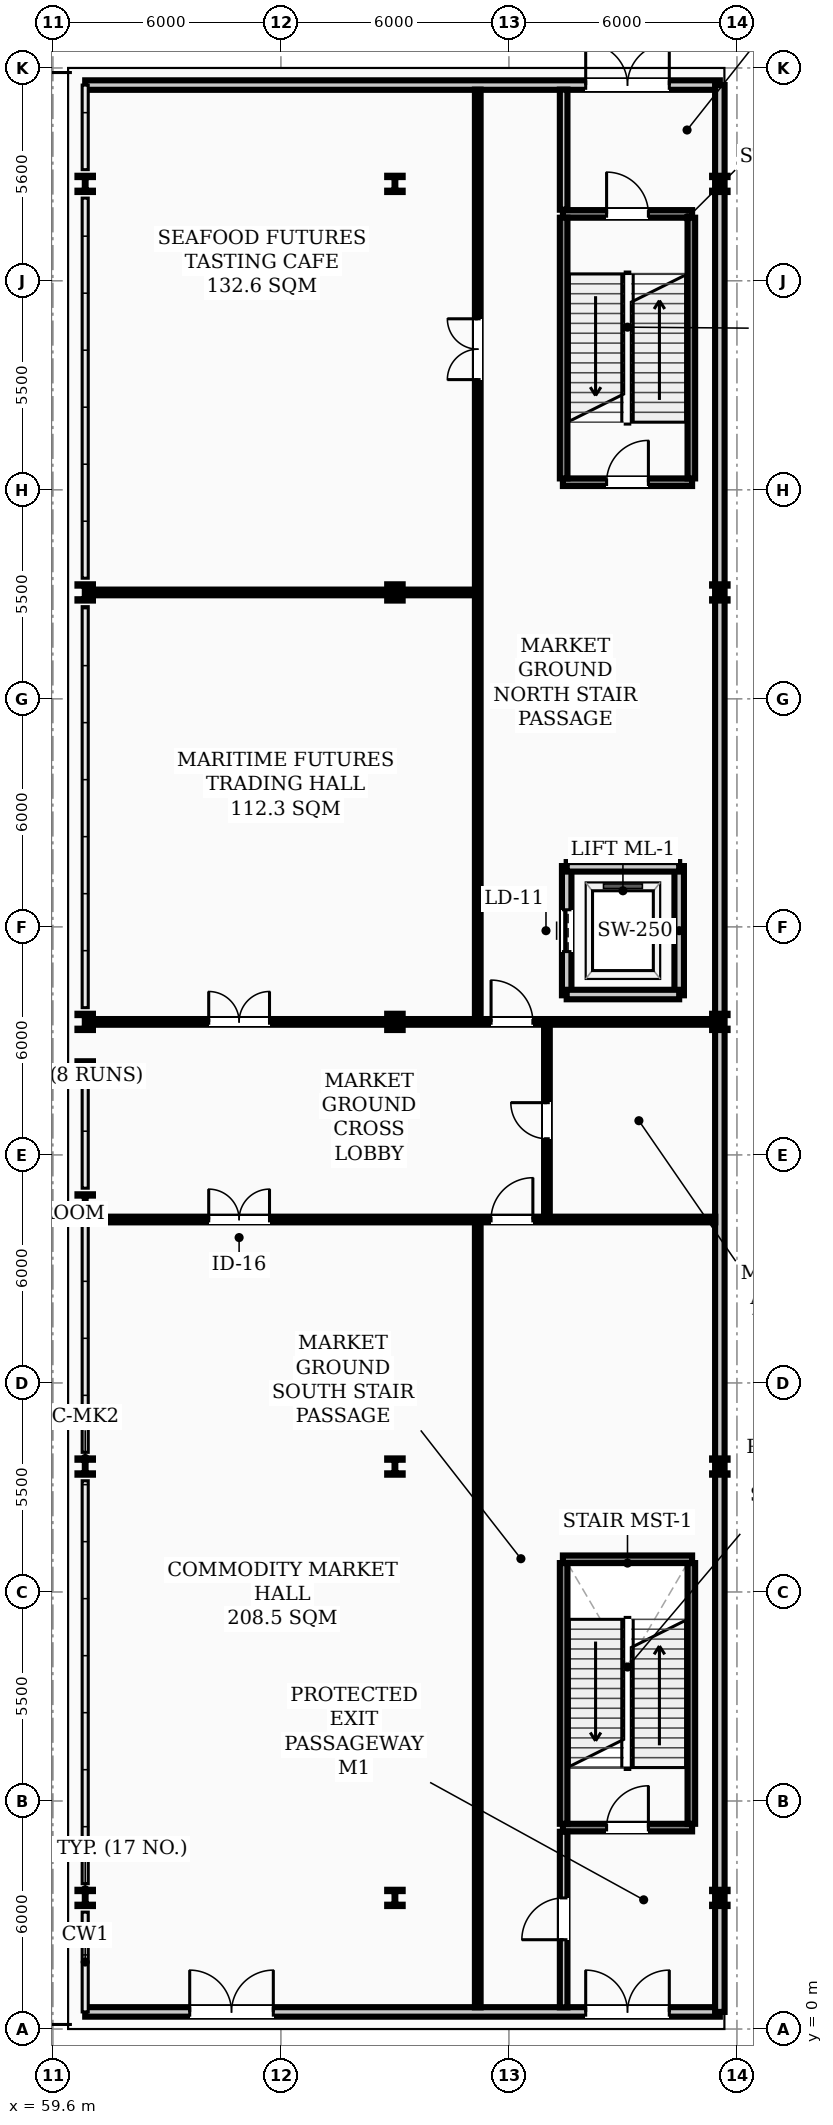
"""IFC4 building model, lengths in metres.
Left out: names, types, materials, properties, quantities, classifications, styles, units other than length and angle.
Written with IfcOpenShell. Run it as: python <this file> out.ifc"""

import sys

from ifc_helpers import new_model, si_unit, direction, frame, frame_2d, origin, origin_2d, place, context, subcontext, project, spatial, rectangle, i_section, extrude, element, fill, save


model = new_model("IFC4")
c1 = context("Model", 3, precision=1e-05, world=origin(), true_north=direction((0.0, 1.0)))
c2 = subcontext(c1, "Body", "Model", "MODEL_VIEW")
j1 = project(units=[si_unit("LENGTHUNIT", "METRE"), si_unit("PLANEANGLEUNIT", "RADIAN")], contexts=[c1])
p1 = place(None, origin())
s1 = spatial("IfcSite", under=j1, at=p1, CompositionType="ELEMENT")
p2 = place(p1, origin())
s2 = spatial("IfcBuilding", under=s1, at=p2, CompositionType="ELEMENT")
p3 = place(p2, origin())
s3 = spatial("IfcBuildingStorey", under=s2, at=p3, CompositionType="ELEMENT", Elevation=0.0)
for number, where, z_axis, x_axis in (
    (1, (60.45, 3.45, 0.0), (0.0, 0.0, 1.0), (1.0, 0.0, 0.0)),
    (2, (60.45, 14.8, 0.0), (0.0, 0.0, 1.0), (1.0, 0.0, 0.0)),
    (3, (60.45, 21.75, 0.0), (0.0, 0.0, 1.0), (1.0, 0.0, 0.0)),
    (4, (60.45, 25.25, 0.0), (0.0, 0.0, 1.0), (1.0, 0.0, 0.0)),
    (5, (60.45, 26.5, 0.0), (0.0, 0.0, 1.0), (1.0, 0.0, 0.0)),
    (6, (60.45, 37.8, 0.0), (0.0, 0.0, 1.0), (1.0, 0.0, 0.0)),
    (7, (60.45, 48.55, 0.0), (0.0, 0.0, 1.0), (1.0, 0.0, 0.0)),
    (8, (68.6, 3.45, 0.0), (0.0, 0.0, 1.0), (1.0, 0.0, 0.0)),
    (9, (68.6, 14.8, 0.0), (0.0, 0.0, 1.0), (1.0, 0.0, 0.0)),
    (10, (68.6, 26.5, 0.0), (0.0, 0.0, 1.0), (1.0, 0.0, 0.0)),
    (11, (68.6, 37.8, 0.0), (0.0, 0.0, 1.0), (1.0, 0.0, 0.0)),
    (12, (68.6, 48.55, 0.0), (0.0, 0.0, 1.0), (1.0, 0.0, 0.0)),
    (13, (77.15, 3.45, 0.0), (0.0, 0.0, 1.0), (1.0, 0.0, 0.0)),
    (14, (77.15, 14.8, 0.0), (0.0, 0.0, 1.0), (1.0, 0.0, 0.0)),
    (15, (77.15, 26.5, 0.0), (0.0, 0.0, 1.0), (1.0, 0.0, 0.0)),
    (16, (77.15, 37.8, 0.0), (0.0, 0.0, 1.0), (1.0, 0.0, 0.0)),
    (17, (77.15, 48.55, 0.0), (0.0, 0.0, 1.0), (1.0, 0.0, 0.0)),
):
    element("IfcColumn", number, at=place(p3, frame(where, z_axis=z_axis, x_axis=x_axis)), inside=s3, PredefinedType="COLUMN", context=c2, shape_type="SweptSolid", body=[
        extrude(i_section(OverallWidth=0.407, OverallDepth=0.428, WebThickness=0.02, FlangeThickness=0.035, FilletRadius=0.022, at=origin_2d()), origin(), (0.0, 0.0, 1.0), 5.8),
    ])
p4 = place(p3, frame((60.45, 0.45, 0.0), z_axis=(0.0, 0.0, 1.0), x_axis=(1.0, 0.0, 0.0)))
e18 = element("IfcWall", 18, at=p4, inside=s3, PredefinedType="STANDARD", context=c2, shape_type="SweptSolid", body=[
    extrude(rectangle(XDim=16.7, YDim=0.25, at=frame_2d((8.35, 0.0))), origin(), (0.0, 0.0, 1.0), 4.75),
])
p5 = place(p4, frame((2.75, 0.0, 0.0)))
e19 = element("IfcOpeningElement", 19, at=p5, cuts=e18, PredefinedType="OPENING", context=c2, shape_type="SweptSolid", body=[
    extrude(rectangle(XDim=2.2, YDim=2.4, at=frame_2d((1.1, 1.2))), frame((0.0, 0.135, 0.0), z_axis=(0.0, -1.0, 0.0), x_axis=(1.0, 0.0, 0.0)), (0.0, 0.0, 1.0), 0.27),
])
p6 = place(p4, frame((13.17, 0.0, 0.0)))
e20 = element("IfcOpeningElement", 20, at=p6, cuts=e18, PredefinedType="OPENING", context=c2, shape_type="SweptSolid", body=[
    extrude(rectangle(XDim=2.2, YDim=2.4, at=frame_2d((1.1, 1.2))), frame((0.0, 0.135, 0.0), z_axis=(0.0, -1.0, 0.0), x_axis=(1.0, 0.0, 0.0)), (0.0, 0.0, 1.0), 0.27),
])
p7 = place(p3, frame((60.45, 51.15, 0.0), z_axis=(0.0, 0.0, 1.0), x_axis=(1.0, 0.0, 0.0)))
e21 = element("IfcWall", 21, at=p7, inside=s3, PredefinedType="STANDARD", context=c2, shape_type="SweptSolid", body=[
    extrude(rectangle(XDim=16.7, YDim=0.25, at=frame_2d((8.35, 0.0))), origin(), (0.0, 0.0, 1.0), 4.75),
])
p8 = place(p7, frame((13.17, 0.0, 0.0)))
e22 = element("IfcOpeningElement", 22, at=p8, cuts=e21, PredefinedType="OPENING", context=c2, shape_type="SweptSolid", body=[
    extrude(rectangle(XDim=2.2, YDim=2.4, at=frame_2d((1.1, 1.2))), frame((0.0, 0.135, 0.0), z_axis=(0.0, -1.0, 0.0), x_axis=(1.0, 0.0, 0.0)), (0.0, 0.0, 1.0), 0.27),
])
p9 = place(p3, frame((77.15, 0.45, 0.0), z_axis=(0.0, 0.0, 1.0), x_axis=(0.0, 1.0, 0.0)))
e23 = element("IfcWall", 23, at=p9, inside=s3, PredefinedType="STANDARD", context=c2, shape_type="SweptSolid", body=[
    extrude(rectangle(XDim=50.7, YDim=0.25, at=frame_2d((25.35, 0.0))), origin(), (0.0, 0.0, 1.0), 4.75),
])
p10 = place(p3, frame((73.02, 5.3, 0.0), z_axis=(0.0, 0.0, 1.0), x_axis=(1.0, 0.0, 0.0)))
e24 = element("IfcWall", 24, at=p10, inside=s3, PredefinedType="STANDARD", context=c2, shape_type="SweptSolid", body=[
    extrude(rectangle(XDim=3.4, YDim=0.2, at=frame_2d((1.7, 0.0))), origin(), (0.0, 0.0, 1.0), 5.58),
])
p11 = place(p10, frame((1.15, 0.0, 0.0)))
e25 = element("IfcOpeningElement", 25, at=p11, cuts=e24, PredefinedType="OPENING", context=c2, shape_type="SweptSolid", body=[
    extrude(rectangle(XDim=1.1, YDim=2.08, at=frame_2d((0.55, 1.04))), frame((0.0, 0.11, 0.0), z_axis=(0.0, -1.0, 0.0), x_axis=(1.0, 0.0, 0.0)), (0.0, 0.0, 1.0), 0.22),
])
p12 = place(p3, frame((73.02, 12.36, 0.0), z_axis=(0.0, 0.0, 1.0), x_axis=(1.0, 0.0, 0.0)))
e26 = element("IfcWall", 26, at=p12, inside=s3, PredefinedType="STANDARD", context=c2, shape_type="SweptSolid", body=[
    extrude(rectangle(XDim=3.4, YDim=0.2, at=frame_2d((1.7, 0.0))), origin(), (0.0, 0.0, 1.0), 5.58),
])
for number, where, z_axis, x_axis in (
    (27, (73.04, 5.4, 0.0), (0.0, 0.0, 1.0), (0.0, 1.0, 0.0)),
    (28, (76.4, 5.4, 0.0), (0.0, 0.0, 1.0), (0.0, 1.0, 0.0)),
):
    element("IfcWall", number, at=place(p3, frame(where, z_axis=z_axis, x_axis=x_axis)), inside=s3, PredefinedType="STANDARD", context=c2, shape_type="SweptSolid", body=[
        extrude(rectangle(XDim=6.86, YDim=0.2, at=frame_2d((3.43, 0.0))), origin(), (0.0, 0.0, 1.0), 5.58),
    ])
p13 = place(p3, frame((73.02, 40.7, 0.0), z_axis=(0.0, 0.0, 1.0), x_axis=(1.0, 0.0, 0.0)))
e29 = element("IfcWall", 29, at=p13, inside=s3, PredefinedType="STANDARD", context=c2, shape_type="SweptSolid", body=[
    extrude(rectangle(XDim=3.4, YDim=0.2, at=frame_2d((1.7, 0.0))), origin(), (0.0, 0.0, 1.0), 5.58),
])
p14 = place(p13, frame((1.15, 0.0, 0.0)))
e30 = element("IfcOpeningElement", 30, at=p14, cuts=e29, PredefinedType="OPENING", context=c2, shape_type="SweptSolid", body=[
    extrude(rectangle(XDim=1.1, YDim=2.08, at=frame_2d((0.55, 1.04))), frame((0.0, 0.11, 0.0), z_axis=(0.0, -1.0, 0.0), x_axis=(1.0, 0.0, 0.0)), (0.0, 0.0, 1.0), 0.22),
])
p15 = place(p3, frame((73.02, 47.76, 0.0), z_axis=(0.0, 0.0, 1.0), x_axis=(1.0, 0.0, 0.0)))
e31 = element("IfcWall", 31, at=p15, inside=s3, PredefinedType="STANDARD", context=c2, shape_type="SweptSolid", body=[
    extrude(rectangle(XDim=3.4, YDim=0.2, at=frame_2d((1.7, 0.0))), origin(), (0.0, 0.0, 1.0), 5.58),
])
p16 = place(p15, frame((1.15, 0.0, 0.0)))
e32 = element("IfcOpeningElement", 32, at=p16, cuts=e31, PredefinedType="OPENING", context=c2, shape_type="SweptSolid", body=[
    extrude(rectangle(XDim=1.1, YDim=2.08, at=frame_2d((0.55, 1.04))), frame((0.0, 0.11, 0.0), z_axis=(0.0, -1.0, 0.0), x_axis=(1.0, 0.0, 0.0)), (0.0, 0.0, 1.0), 0.22),
])
for number, where, z_axis, x_axis in (
    (33, (73.04, 40.8, 0.0), (0.0, 0.0, 1.0), (0.0, 1.0, 0.0)),
    (34, (76.4, 40.8, 0.0), (0.0, 0.0, 1.0), (0.0, 1.0, 0.0)),
):
    element("IfcWall", number, at=place(p3, frame(where, z_axis=z_axis, x_axis=x_axis)), inside=s3, PredefinedType="STANDARD", context=c2, shape_type="SweptSolid", body=[
        extrude(rectangle(XDim=6.86, YDim=0.2, at=frame_2d((3.43, 0.0))), origin(), (0.0, 0.0, 1.0), 5.58),
    ])
p17 = place(p3, frame((73.12, 27.2, 0.0), z_axis=(0.0, 0.0, 1.0), x_axis=(0.0, 1.0, 0.0)))
e35 = element("IfcWall", 35, at=p17, inside=s3, PredefinedType="STANDARD", context=c2, shape_type="SweptSolid", body=[
    extrude(rectangle(XDim=3.4, YDim=0.25, at=frame_2d((1.7, 0.0))), origin(), (0.0, 0.0, 1.0), 5.55),
])
p18 = place(p17, frame((1.15, 0.0, 0.0)))
e36 = element("IfcOpeningElement", 36, at=p18, cuts=e35, PredefinedType="OPENING", context=c2, shape_type="SweptSolid", body=[
    extrude(rectangle(XDim=1.1, YDim=2.08, at=frame_2d((0.55, 1.04))), frame((0.0, 0.135, 0.0), z_axis=(0.0, -1.0, 0.0), x_axis=(1.0, 0.0, 0.0)), (0.0, 0.0, 1.0), 0.27),
])
p19 = place(p3, frame((76.08, 27.2, 0.0), z_axis=(0.0, 0.0, 1.0), x_axis=(0.0, 1.0, 0.0)))
e37 = element("IfcWall", 37, at=p19, inside=s3, PredefinedType="STANDARD", context=c2, shape_type="SweptSolid", body=[
    extrude(rectangle(XDim=3.4, YDim=0.25, at=frame_2d((1.7, 0.0))), origin(), (0.0, 0.0, 1.0), 5.55),
])
for number, where, z_axis, x_axis in (
    (38, (73.12, 27.22, 0.0), (0.0, 0.0, 1.0), (1.0, 0.0, 0.0)),
    (39, (73.12, 30.58, 0.0), (0.0, 0.0, 1.0), (1.0, 0.0, 0.0)),
):
    element("IfcWall", number, at=place(p3, frame(where, z_axis=z_axis, x_axis=x_axis)), inside=s3, PredefinedType="STANDARD", context=c2, shape_type="SweptSolid", body=[
        extrude(rectangle(XDim=2.96, YDim=0.25, at=frame_2d((1.48, 0.0))), origin(), (0.0, 0.0, 1.0), 5.55),
    ])
p20 = place(p3, frame((60.53, 21.3, 0.0), z_axis=(0.0, 0.0, 1.0), x_axis=(1.0, 0.0, 0.0)))
e40 = element("IfcWall", 40, at=p20, inside=s3, PredefinedType="PARTITIONING", context=c2, shape_type="SweptSolid", body=[
    extrude(rectangle(XDim=16.5, YDim=0.15, at=frame_2d((8.25, 0.0))), origin(), (0.0, 0.0, 1.0), 4.31),
])
p21 = place(p20, frame((3.17, 0.0, 0.0)))
e41 = element("IfcOpeningElement", 41, at=p21, cuts=e40, PredefinedType="OPENING", context=c2, shape_type="SweptSolid", body=[
    extrude(rectangle(XDim=1.6, YDim=2.08, at=frame_2d((0.8, 1.04))), frame((0.0, 0.085, 0.0), z_axis=(0.0, -1.0, 0.0), x_axis=(1.0, 0.0, 0.0)), (0.0, 0.0, 1.0), 0.17),
])
p22 = place(p20, frame((10.6, 0.0, 0.0)))
e42 = element("IfcOpeningElement", 42, at=p22, cuts=e40, PredefinedType="OPENING", context=c2, shape_type="SweptSolid", body=[
    extrude(rectangle(XDim=1.1, YDim=2.08, at=frame_2d((0.55, 1.04))), frame((0.0, 0.085, 0.0), z_axis=(0.0, -1.0, 0.0), x_axis=(1.0, 0.0, 0.0)), (0.0, 0.0, 1.0), 0.17),
])
p23 = place(p3, frame((60.53, 26.5, 0.0), z_axis=(0.0, 0.0, 1.0), x_axis=(1.0, 0.0, 0.0)))
e43 = element("IfcWall", 43, at=p23, inside=s3, PredefinedType="PARTITIONING", context=c2, shape_type="SweptSolid", body=[
    extrude(rectangle(XDim=16.5, YDim=0.15, at=frame_2d((8.25, 0.0))), origin(), (0.0, 0.0, 1.0), 4.96),
])
p24 = place(p23, frame((3.17, 0.0, 0.0)))
e44 = element("IfcOpeningElement", 44, at=p24, cuts=e43, PredefinedType="OPENING", context=c2, shape_type="SweptSolid", body=[
    extrude(rectangle(XDim=1.6, YDim=2.08, at=frame_2d((0.8, 1.04))), frame((0.0, 0.085, 0.0), z_axis=(0.0, -1.0, 0.0), x_axis=(1.0, 0.0, 0.0)), (0.0, 0.0, 1.0), 0.17),
])
p25 = place(p23, frame((10.6, 0.0, 0.0)))
e45 = element("IfcOpeningElement", 45, at=p25, cuts=e43, PredefinedType="OPENING", context=c2, shape_type="SweptSolid", body=[
    extrude(rectangle(XDim=1.1, YDim=2.08, at=frame_2d((0.55, 1.04))), frame((0.0, 0.085, 0.0), z_axis=(0.0, -1.0, 0.0), x_axis=(1.0, 0.0, 0.0)), (0.0, 0.0, 1.0), 0.17),
])
p26 = place(p3, frame((60.53, 37.8, 0.0), z_axis=(0.0, 0.0, 1.0), x_axis=(1.0, 0.0, 0.0)))
e46 = element("IfcWall", 46, at=p26, inside=s3, PredefinedType="PARTITIONING", context=c2, shape_type="SweptSolid", body=[
    extrude(rectangle(XDim=10.25, YDim=0.15, at=frame_2d((5.125, 0.0))), origin(), (0.0, 0.0, 1.0), 4.96),
])
p27 = place(p3, frame((73.04, 0.57, 0.0), z_axis=(0.0, 0.0, 1.0), x_axis=(0.0, 1.0, 0.0)))
e47 = element("IfcWall", 47, at=p27, inside=s3, PredefinedType="STANDARD", context=c2, shape_type="SweptSolid", body=[
    extrude(rectangle(XDim=4.62, YDim=0.2, at=frame_2d((2.31, 0.0))), origin(), (0.0, 0.0, 1.0), 4.96),
])
p28 = place(p27, frame((1.78, 0.0, 0.0)))
e48 = element("IfcOpeningElement", 48, at=p28, cuts=e47, PredefinedType="OPENING", context=c2, shape_type="SweptSolid", body=[
    extrude(rectangle(XDim=1.1, YDim=2.08, at=frame_2d((0.55, 1.04))), frame((0.0, 0.11, 0.0), z_axis=(0.0, -1.0, 0.0), x_axis=(1.0, 0.0, 0.0)), (0.0, 0.0, 1.0), 0.22),
])
p29 = place(p3, frame((73.04, 47.87, 0.0), z_axis=(0.0, 0.0, 1.0), x_axis=(0.0, 1.0, 0.0)))
e49 = element("IfcWall", 49, at=p29, inside=s3, PredefinedType="STANDARD", context=c2, shape_type="SweptSolid", body=[
    extrude(rectangle(XDim=3.16, YDim=0.2, at=frame_2d((1.58, 0.0))), origin(), (0.0, 0.0, 1.0), 4.96),
])
p30 = place(p3, frame((72.6, 21.385, 0.0), z_axis=(0.0, 0.0, 1.0), x_axis=(0.0, 1.0, 0.0)))
e50 = element("IfcWall", 50, at=p30, inside=s3, PredefinedType="PARTITIONING", context=c2, shape_type="SweptSolid", body=[
    extrude(rectangle(XDim=5.03, YDim=0.15, at=frame_2d((2.515, 0.0))), origin(), (0.0, 0.0, 1.0), 4.96),
])
p31 = place(p30, frame((2.04, 0.0, 0.0)))
e51 = element("IfcOpeningElement", 51, at=p31, cuts=e50, PredefinedType="OPENING", context=c2, shape_type="SweptSolid", body=[
    extrude(rectangle(XDim=0.95, YDim=2.08, at=frame_2d((0.475, 1.04))), frame((0.0, 0.085, 0.0), z_axis=(0.0, -1.0, 0.0), x_axis=(1.0, 0.0, 0.0)), (0.0, 0.0, 1.0), 0.17),
])
p32 = place(p3, frame((70.78, 0.57, 0.0), z_axis=(0.0, 0.0, 1.0), x_axis=(0.0, 1.0, 0.0)))
e52 = element("IfcWall", 52, at=p32, inside=s3, PredefinedType="PARTITIONING", context=c2, shape_type="SweptSolid", body=[
    extrude(rectangle(XDim=20.645, YDim=0.15, at=frame_2d((10.323, 0.0))), origin(), (0.0, 0.0, 1.0), 4.96),
])
p33 = place(p3, frame((70.78, 26.585, 0.0), z_axis=(0.0, 0.0, 1.0), x_axis=(0.0, 1.0, 0.0)))
e53 = element("IfcWall", 53, at=p33, inside=s3, PredefinedType="PARTITIONING", context=c2, shape_type="SweptSolid", body=[
    extrude(rectangle(XDim=24.445, YDim=0.15, at=frame_2d((12.223, 0.0))), origin(), (0.0, 0.0, 1.0), 4.96),
])
p34 = place(p33, frame((16.815, 0.0, 0.0)))
e54 = element("IfcOpeningElement", 54, at=p34, cuts=e53, PredefinedType="OPENING", context=c2, shape_type="SweptSolid", body=[
    extrude(rectangle(XDim=1.6, YDim=2.08, at=frame_2d((0.8, 1.04))), frame((0.0, 0.085, 0.0), z_axis=(0.0, -1.0, 0.0), x_axis=(1.0, 0.0, 0.0)), (0.0, 0.0, 1.0), 0.17),
])
p35 = place(p5, frame((2.2, 0.0, 0.0), z_axis=(0.0, 0.0, 1.0), x_axis=(-1.0, 0.0, 0.0)))
e55 = element("IfcDoor", 55, at=p35, inside=s3, OperationType="DOUBLE_DOOR_SINGLE_SWING", PredefinedType="DOOR", context=c2, shape_type="SweptSolid", body=[
    extrude(rectangle(XDim=2.2, YDim=2.4, at=frame_2d((1.1, 1.2))), frame((0.0, 0.025, 0.0), z_axis=(0.0, -1.0, 0.0), x_axis=(1.0, 0.0, 0.0)), (0.0, 0.0, 1.0), 0.05),
])
fill(e19, e55)
p36 = place(p6, frame((2.2, 0.0, 0.0), z_axis=(0.0, 0.0, 1.0), x_axis=(-1.0, 0.0, 0.0)))
e56 = element("IfcDoor", 56, at=p36, inside=s3, OperationType="DOUBLE_DOOR_SINGLE_SWING", PredefinedType="DOOR", context=c2, shape_type="SweptSolid", body=[
    extrude(rectangle(XDim=2.2, YDim=2.4, at=frame_2d((1.1, 1.2))), frame((0.0, 0.025, 0.0), z_axis=(0.0, -1.0, 0.0), x_axis=(1.0, 0.0, 0.0)), (0.0, 0.0, 1.0), 0.05),
])
fill(e20, e56)
p37 = place(p8, origin())
e57 = element("IfcDoor", 57, at=p37, inside=s3, OperationType="DOUBLE_DOOR_SINGLE_SWING", PredefinedType="DOOR", context=c2, shape_type="SweptSolid", body=[
    extrude(rectangle(XDim=2.2, YDim=2.4, at=frame_2d((1.1, 1.2))), frame((0.0, 0.025, 0.0), z_axis=(0.0, -1.0, 0.0), x_axis=(1.0, 0.0, 0.0)), (0.0, 0.0, 1.0), 0.05),
])
fill(e22, e57)
p38 = place(p11, origin())
e58 = element("IfcDoor", 58, at=p38, inside=s3, OperationType="SINGLE_SWING_RIGHT", PredefinedType="DOOR", context=c2, shape_type="SweptSolid", body=[
    extrude(rectangle(XDim=1.1, YDim=2.08, at=frame_2d((0.55, 1.04))), frame((0.0, 0.025, 0.0), z_axis=(0.0, -1.0, 0.0), x_axis=(1.0, 0.0, 0.0)), (0.0, 0.0, 1.0), 0.05),
])
fill(e25, e58)
p39 = place(p14, origin())
e59 = element("IfcDoor", 59, at=p39, inside=s3, OperationType="SINGLE_SWING_RIGHT", PredefinedType="DOOR", context=c2, shape_type="SweptSolid", body=[
    extrude(rectangle(XDim=1.1, YDim=2.08, at=frame_2d((0.55, 1.04))), frame((0.0, 0.025, 0.0), z_axis=(0.0, -1.0, 0.0), x_axis=(1.0, 0.0, 0.0)), (0.0, 0.0, 1.0), 0.05),
])
fill(e30, e59)
p40 = place(p16, origin())
e60 = element("IfcDoor", 60, at=p40, inside=s3, OperationType="SINGLE_SWING_LEFT", PredefinedType="DOOR", context=c2, shape_type="SweptSolid", body=[
    extrude(rectangle(XDim=1.1, YDim=2.08, at=frame_2d((0.55, 1.04))), frame((0.0, 0.025, 0.0), z_axis=(0.0, -1.0, 0.0), x_axis=(1.0, 0.0, 0.0)), (0.0, 0.0, 1.0), 0.05),
])
fill(e32, e60)
p41 = place(p21, origin())
e61 = element("IfcDoor", 61, at=p41, inside=s3, OperationType="DOUBLE_DOOR_SINGLE_SWING", PredefinedType="DOOR", context=c2, shape_type="SweptSolid", body=[
    extrude(rectangle(XDim=1.6, YDim=2.08, at=frame_2d((0.8, 1.04))), frame((0.0, 0.025, 0.0), z_axis=(0.0, -1.0, 0.0), x_axis=(1.0, 0.0, 0.0)), (0.0, 0.0, 1.0), 0.05),
])
fill(e41, e61)
p42 = place(p24, origin())
e62 = element("IfcDoor", 62, at=p42, inside=s3, OperationType="DOUBLE_DOOR_SINGLE_SWING", PredefinedType="DOOR", context=c2, shape_type="SweptSolid", body=[
    extrude(rectangle(XDim=1.6, YDim=2.08, at=frame_2d((0.8, 1.04))), frame((0.0, 0.025, 0.0), z_axis=(0.0, -1.0, 0.0), x_axis=(1.0, 0.0, 0.0)), (0.0, 0.0, 1.0), 0.05),
])
fill(e44, e62)
p43 = place(p34, origin())
e63 = element("IfcDoor", 63, at=p43, inside=s3, OperationType="DOUBLE_DOOR_SINGLE_SWING", PredefinedType="DOOR", context=c2, shape_type="SweptSolid", body=[
    extrude(rectangle(XDim=1.6, YDim=2.08, at=frame_2d((0.8, 1.04))), frame((0.0, 0.025, 0.0), z_axis=(0.0, -1.0, 0.0), x_axis=(1.0, 0.0, 0.0)), (0.0, 0.0, 1.0), 0.05),
])
fill(e54, e63)
p44 = place(p22, origin())
e64 = element("IfcDoor", 64, at=p44, inside=s3, OperationType="SINGLE_SWING_RIGHT", PredefinedType="DOOR", context=c2, shape_type="SweptSolid", body=[
    extrude(rectangle(XDim=1.1, YDim=2.08, at=frame_2d((0.55, 1.04))), frame((0.0, 0.025, 0.0), z_axis=(0.0, -1.0, 0.0), x_axis=(1.0, 0.0, 0.0)), (0.0, 0.0, 1.0), 0.05),
])
fill(e42, e64)
p45 = place(p25, origin())
e65 = element("IfcDoor", 65, at=p45, inside=s3, OperationType="SINGLE_SWING_LEFT", PredefinedType="DOOR", context=c2, shape_type="SweptSolid", body=[
    extrude(rectangle(XDim=1.1, YDim=2.08, at=frame_2d((0.55, 1.04))), frame((0.0, 0.025, 0.0), z_axis=(0.0, -1.0, 0.0), x_axis=(1.0, 0.0, 0.0)), (0.0, 0.0, 1.0), 0.05),
])
fill(e45, e65)
p46 = place(p31, origin())
e66 = element("IfcDoor", 66, at=p46, inside=s3, OperationType="SINGLE_SWING_RIGHT", PredefinedType="DOOR", context=c2, shape_type="SweptSolid", body=[
    extrude(rectangle(XDim=0.95, YDim=2.08, at=frame_2d((0.475, 1.04))), frame((0.0, 0.025, 0.0), z_axis=(0.0, -1.0, 0.0), x_axis=(1.0, 0.0, 0.0)), (0.0, 0.0, 1.0), 0.05),
])
fill(e51, e66)
p47 = place(p28, origin())
e67 = element("IfcDoor", 67, at=p47, inside=s3, OperationType="SINGLE_SWING_LEFT", PredefinedType="DOOR", context=c2, shape_type="SweptSolid", body=[
    extrude(rectangle(XDim=1.1, YDim=2.08, at=frame_2d((0.55, 1.04))), frame((0.0, 0.025, 0.0), z_axis=(0.0, -1.0, 0.0), x_axis=(1.0, 0.0, 0.0)), (0.0, 0.0, 1.0), 0.05),
])
fill(e48, e67)
p48 = place(p18, origin())
e68 = element("IfcDoor", 68, at=p48, inside=s3, OperationType="SLIDING_TO_LEFT", PredefinedType="DOOR", context=c2, shape_type="SweptSolid", body=[
    extrude(rectangle(XDim=1.1, YDim=2.08, at=frame_2d((0.55, 1.04))), frame((0.0, 0.025, 0.0), z_axis=(0.0, -1.0, 0.0), x_axis=(1.0, 0.0, 0.0)), (0.0, 0.0, 1.0), 0.05),
])
fill(e36, e68)
save(model, sys.argv[1])
